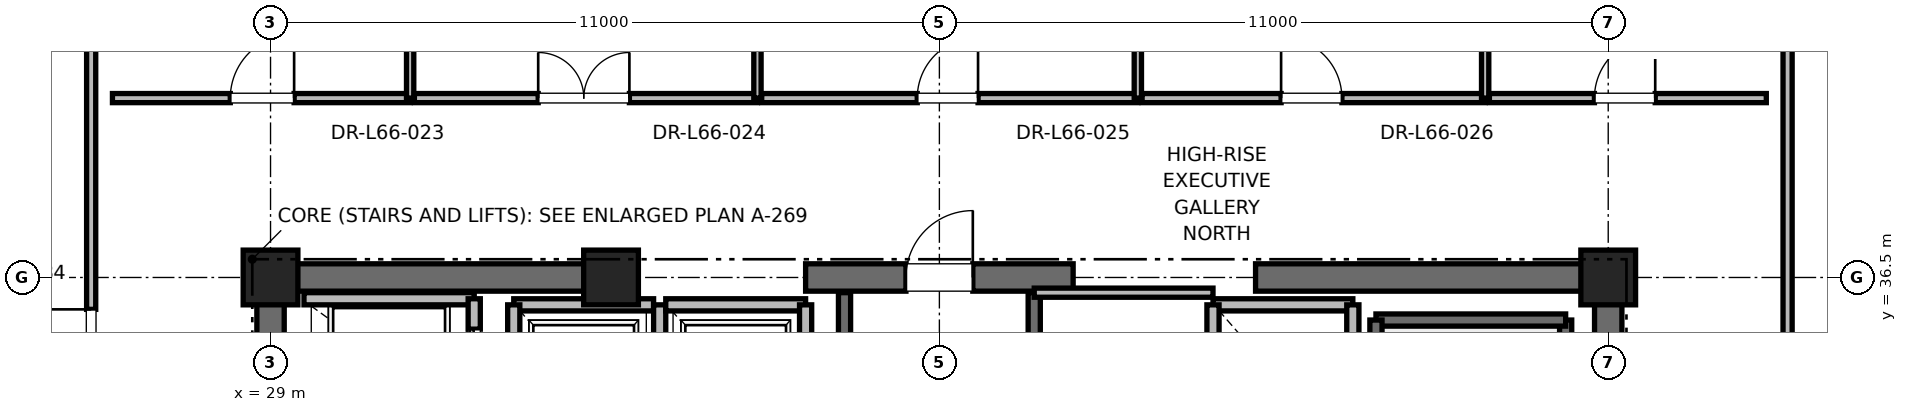
"""IFC4 building model, lengths in metres.
Left out: names, types, materials, properties, quantities, classifications, styles, units other than length and angle.
Written with IfcOpenShell. Run it as: python <this file> out.ifc"""

import sys

from ifc_helpers import new_model, si_unit, direction, frame, frame_2d, origin, origin_2d, place, context, subcontext, project, spatial, rectangle, extrude, element, fill, save


model = new_model("IFC4")
c1 = context("Model", 3, precision=1e-05, world=origin(), true_north=direction((0.0, 1.0)))
c2 = subcontext(c1, "Body", "Model", "MODEL_VIEW")
j1 = project(units=[si_unit("LENGTHUNIT", "METRE"), si_unit("PLANEANGLEUNIT", "RADIAN")], contexts=[c1])
p1 = place(None, origin())
s1 = spatial("IfcSite", under=j1, at=p1, CompositionType="ELEMENT")
p2 = place(p1, origin())
s2 = spatial("IfcBuilding", under=s1, at=p2, CompositionType="ELEMENT")
p3 = place(p2, frame((0.0, 0.0, 283.2)))
s3 = spatial("IfcBuildingStorey", under=s2, at=p3, CompositionType="ELEMENT", Elevation=283.2)
for number, where, z_axis, x_axis in (
    (1, (29.0, 36.5, 0.0), (0.0, 0.0, 1.0), (1.0, 0.0, 0.0)),
    (2, (51.0, 36.5, 0.0), (0.0, 0.0, 1.0), (1.0, 0.0, 0.0)),
    (3, (34.6, 36.5, 0.0), (0.0, 0.0, 1.0), (1.0, 0.0, 0.0)),
):
    element("IfcColumn", number, at=place(p3, frame(where, z_axis=z_axis, x_axis=x_axis)), inside=s3, PredefinedType="PILASTER", context=c2, shape_type="SweptSolid", body=[
        extrude(rectangle(XDim=0.9, YDim=0.9, at=origin_2d()), origin(), (0.0, 0.0, 1.0), 4.0),
    ])
p4 = place(p3, frame((29.0, 36.5, 0.0), z_axis=(0.0, 0.0, 1.0), x_axis=(1.0, 0.0, 0.0)))
e4 = element("IfcWall", 4, at=p4, inside=s3, PredefinedType="SHEAR", context=c2, shape_type="SweptSolid", body=[
    extrude(rectangle(XDim=5.8, YDim=0.45, at=frame_2d((2.9, 0.0))), origin(), (0.0, 0.0, 1.0), 3.785),
])
p5 = place(p3, frame((37.8, 36.5, 0.0), z_axis=(0.0, 0.0, 1.0), x_axis=(1.0, 0.0, 0.0)))
e5 = element("IfcWall", 5, at=p5, inside=s3, PredefinedType="SHEAR", context=c2, shape_type="SweptSolid", body=[
    extrude(rectangle(XDim=4.4, YDim=0.45, at=frame_2d((2.2, 0.0))), origin(), (0.0, 0.0, 1.0), 3.785),
])
p6 = place(p5, frame((1.65, 0.0, 0.0)))
e6 = element("IfcOpeningElement", 6, at=p6, cuts=e5, PredefinedType="OPENING", context=c2, shape_type="SweptSolid", body=[
    extrude(rectangle(XDim=1.1, YDim=2.15, at=frame_2d((0.55, 1.075))), frame((0.0, 0.225, 0.0), z_axis=(0.0, -1.0, 0.0), x_axis=(1.0, 0.0, 0.0)), (0.0, 0.0, 1.0), 0.45),
])
for number, where, z_axis, x_axis in (
    (7, (45.2, 36.5, 0.0), (0.0, 0.0, 1.0), (1.0, 0.0, 0.0)),
    (8, (29.0, 30.7, 0.0), (0.0, 0.0, 1.0), (0.0, 1.0, 0.0)),
):
    element("IfcWall", number, at=place(p3, frame(where, z_axis=z_axis, x_axis=x_axis)), inside=s3, PredefinedType="SHEAR", context=c2, shape_type="SweptSolid", body=[
        extrude(rectangle(XDim=5.8, YDim=0.45, at=frame_2d((2.9, 0.0))), origin(), (0.0, 0.0, 1.0), 3.785),
    ])
p7 = place(p3, frame((51.0, 27.7, 0.0), z_axis=(0.0, 0.0, 1.0), x_axis=(0.0, 1.0, 0.0)))
e9 = element("IfcWall", 9, at=p7, inside=s3, PredefinedType="SHEAR", context=c2, shape_type="SweptSolid", body=[
    extrude(rectangle(XDim=8.8, YDim=0.45, at=frame_2d((4.4, 0.0))), origin(), (0.0, 0.0, 1.0), 3.785),
])
p8 = place(p3, frame((50.3, 27.65, 0.0), z_axis=(0.0, 0.0, 1.0), x_axis=(0.0, 1.0, 0.0)))
e10 = element("IfcWall", 10, at=p8, inside=s3, PredefinedType="SOLIDWALL", context=c2, shape_type="SweptSolid", body=[
    extrude(rectangle(XDim=8.15, YDim=0.2, at=frame_2d((4.075, 0.0))), origin(), (0.0, 0.0, 1.0), 3.785),
])
p9 = place(p3, frame((47.18, 35.8, 0.0), z_axis=(0.0, 0.0, 1.0), x_axis=(1.0, 0.0, 0.0)))
e11 = element("IfcWall", 11, at=p9, inside=s3, PredefinedType="SOLIDWALL", context=c2, shape_type="SweptSolid", body=[
    extrude(rectangle(XDim=3.12, YDim=0.2, at=frame_2d((1.56, 0.0))), origin(), (0.0, 0.0, 1.0), 3.785),
])
p10 = place(p3, frame((47.18, 27.62, 0.0), z_axis=(0.0, 0.0, 1.0), x_axis=(0.0, 1.0, 0.0)))
e12 = element("IfcWall", 12, at=p10, inside=s3, PredefinedType="SOLIDWALL", context=c2, shape_type="SweptSolid", body=[
    extrude(rectangle(XDim=8.18, YDim=0.2, at=frame_2d((4.09, 0.0))), origin(), (0.0, 0.0, 1.0), 3.785),
])
p11 = place(p3, frame((38.44, 27.38, 0.0), z_axis=(0.0, 0.0, 1.0), x_axis=(0.0, 1.0, 0.0)))
e13 = element("IfcWall", 13, at=p11, inside=s3, PredefinedType="SOLIDWALL", context=c2, shape_type="SweptSolid", body=[
    extrude(rectangle(XDim=8.87, YDim=0.2, at=frame_2d((4.435, 0.0))), origin(), (0.0, 0.0, 1.0), 3.785),
])
p12 = place(p3, frame((41.56, 27.68, 0.0), z_axis=(0.0, 0.0, 1.0), x_axis=(0.0, 1.0, 0.0)))
e14 = element("IfcWall", 14, at=p12, inside=s3, PredefinedType="SOLIDWALL", context=c2, shape_type="SweptSolid", body=[
    extrude(rectangle(XDim=8.57, YDim=0.2, at=frame_2d((4.285, 0.0))), origin(), (0.0, 0.0, 1.0), 3.785),
])
p13 = place(p3, frame((32.35, 36.15, 0.0), z_axis=(0.0, 0.0, 1.0), x_axis=(-1.0, 0.0, 0.0)))
e15 = element("IfcWall", 15, at=p13, inside=s3, PredefinedType="SOLIDWALL", context=c2, shape_type="SweptSolid", body=[
    extrude(rectangle(XDim=2.8, YDim=0.2, at=frame_2d((1.4, 0.0))), origin(), (0.0, 0.0, 1.0), 3.148),
])
p14 = place(p3, frame((32.35, 34.05, 0.0), z_axis=(0.0, 0.0, 1.0), x_axis=(0.0, 1.0, 0.0)))
e16 = element("IfcWall", 16, at=p14, inside=s3, PredefinedType="SOLIDWALL", context=c2, shape_type="SweptSolid", body=[
    extrude(rectangle(XDim=2.1, YDim=0.2, at=frame_2d((1.05, 0.0))), origin(), (0.0, 0.0, 1.0), 3.785),
])
p15 = place(p14, frame((0.5, 0.0, 0.0)))
e17 = element("IfcOpeningElement", 17, at=p15, cuts=e16, PredefinedType="OPENING", context=c2, shape_type="SweptSolid", body=[
    extrude(rectangle(XDim=1.1, YDim=2.2, at=frame_2d((0.55, 1.1))), frame((0.0, 0.1, 0.0), z_axis=(0.0, -1.0, 0.0), x_axis=(1.0, 0.0, 0.0)), (0.0, 0.0, 1.0), 0.2),
])
p16 = place(p3, frame((35.3, 36.05, 0.0), z_axis=(0.0, 0.0, 1.0), x_axis=(-1.0, 0.0, 0.0)))
e18 = element("IfcWall", 18, at=p16, inside=s3, PredefinedType="SOLIDWALL", context=c2, shape_type="SweptSolid", body=[
    extrude(rectangle(XDim=2.3, YDim=0.2, at=frame_2d((1.15, 0.0))), origin(), (0.0, 0.0, 1.0), 2.865),
])
p17 = place(p3, frame((33.0, 36.05, 0.0), z_axis=(0.0, 0.0, 1.0), x_axis=(0.0, -1.0, 0.0)))
e19 = element("IfcWall", 19, at=p17, inside=s3, PredefinedType="SOLIDWALL", context=c2, shape_type="SweptSolid", body=[
    extrude(rectangle(XDim=2.6, YDim=0.2, at=frame_2d((1.3, 0.0))), origin(), (0.0, 0.0, 1.0), 3.785),
])
p18 = place(p3, frame((35.4, 33.45, 0.0), z_axis=(0.0, 0.0, 1.0), x_axis=(0.0, 1.0, 0.0)))
e20 = element("IfcWall", 20, at=p18, inside=s3, PredefinedType="SOLIDWALL", context=c2, shape_type="SweptSolid", body=[
    extrude(rectangle(XDim=2.6, YDim=0.2, at=frame_2d((1.3, 0.0))), origin(), (0.0, 0.0, 1.0), 2.865),
])
p19 = place(p3, frame((37.8, 36.05, 0.0), z_axis=(0.0, 0.0, 1.0), x_axis=(-1.0, 0.0, 0.0)))
e21 = element("IfcWall", 21, at=p19, inside=s3, PredefinedType="SOLIDWALL", context=c2, shape_type="SweptSolid", body=[
    extrude(rectangle(XDim=2.3, YDim=0.2, at=frame_2d((1.15, 0.0))), origin(), (0.0, 0.0, 1.0), 2.865),
])
p20 = place(p3, frame((37.8, 33.45, 0.0), z_axis=(0.0, 0.0, 1.0), x_axis=(0.0, 1.0, 0.0)))
e22 = element("IfcWall", 22, at=p20, inside=s3, PredefinedType="SOLIDWALL", context=c2, shape_type="SweptSolid", body=[
    extrude(rectangle(XDim=2.6, YDim=0.2, at=frame_2d((1.3, 0.0))), origin(), (0.0, 0.0, 1.0), 2.865),
])
p21 = place(p3, frame((46.8, 36.05, 0.0), z_axis=(0.0, 0.0, 1.0), x_axis=(-1.0, 0.0, 0.0)))
e23 = element("IfcWall", 23, at=p21, inside=s3, PredefinedType="SOLIDWALL", context=c2, shape_type="SweptSolid", body=[
    extrude(rectangle(XDim=2.3, YDim=0.2, at=frame_2d((1.15, 0.0))), origin(), (0.0, 0.0, 1.0), 2.865),
])
p22 = place(p3, frame((44.5, 36.05, 0.0), z_axis=(0.0, 0.0, 1.0), x_axis=(0.0, -1.0, 0.0)))
e24 = element("IfcWall", 24, at=p22, inside=s3, PredefinedType="SOLIDWALL", context=c2, shape_type="SweptSolid", body=[
    extrude(rectangle(XDim=2.6, YDim=0.2, at=frame_2d((1.3, 0.0))), origin(), (0.0, 0.0, 1.0), 2.865),
])
p23 = place(p3, frame((46.8, 33.45, 0.0), z_axis=(0.0, 0.0, 1.0), x_axis=(0.0, 1.0, 0.0)))
e25 = element("IfcWall", 25, at=p23, inside=s3, PredefinedType="SOLIDWALL", context=c2, shape_type="SweptSolid", body=[
    extrude(rectangle(XDim=2.6, YDim=0.2, at=frame_2d((1.3, 0.0))), origin(), (0.0, 0.0, 1.0), 3.785),
])
p24 = place(p3, frame((41.56, 36.25, 0.0), z_axis=(0.0, 0.0, 1.0), x_axis=(1.0, 0.0, 0.0)))
e26 = element("IfcWall", 26, at=p24, inside=s3, PredefinedType="PARTITIONING", context=c2, shape_type="SweptSolid", body=[
    extrude(rectangle(XDim=2.94, YDim=0.15, at=frame_2d((1.47, 0.0))), origin(), (0.0, 0.0, 1.0), 2.85),
])
p25 = place(p3, frame((26.4, 39.45, 0.0), z_axis=(0.0, 0.0, 1.0), x_axis=(1.0, 0.0, 0.0)))
e27 = element("IfcWall", 27, at=p25, inside=s3, PredefinedType="PARTITIONING", context=c2, shape_type="SweptSolid", body=[
    extrude(rectangle(XDim=4.896, YDim=0.15, at=frame_2d((2.448, 0.0))), origin(), (0.0, 0.0, 1.0), 2.85),
])
p26 = place(p25, frame((1.938, 0.0, 0.0)))
e28 = element("IfcOpeningElement", 28, at=p26, cuts=e27, PredefinedType="OPENING", context=c2, shape_type="SweptSolid", body=[
    extrude(rectangle(XDim=1.05, YDim=2.2, at=frame_2d((0.525, 1.1))), frame((0.0, 0.075, 0.0), z_axis=(0.0, -1.0, 0.0), x_axis=(1.0, 0.0, 0.0)), (0.0, 0.0, 1.0), 0.15),
])
p27 = place(p3, frame((31.296, 39.45, 0.0), z_axis=(0.0, 0.0, 1.0), x_axis=(0.0, 1.0, 0.0)))
e29 = element("IfcWall", 29, at=p27, inside=s3, PredefinedType="PARTITIONING", context=c2, shape_type="SweptSolid", body=[
    extrude(rectangle(XDim=10.09, YDim=0.12, at=frame_2d((5.045, 0.0))), origin(), (0.0, 0.0, 1.0), 2.415),
])
p28 = place(p3, frame((31.366, 39.45, 0.0), z_axis=(0.0, 0.0, 1.0), x_axis=(1.0, 0.0, 0.0)))
e30 = element("IfcWall", 30, at=p28, inside=s3, PredefinedType="PARTITIONING", context=c2, shape_type="SweptSolid", body=[
    extrude(rectangle(XDim=5.642, YDim=0.15, at=frame_2d((2.821, 0.0))), origin(), (0.0, 0.0, 1.0), 2.85),
])
p29 = place(p28, frame((2.036, 0.0, 0.0)))
e31 = element("IfcOpeningElement", 31, at=p29, cuts=e30, PredefinedType="OPENING", context=c2, shape_type="SweptSolid", body=[
    extrude(rectangle(XDim=1.5, YDim=2.25, at=frame_2d((0.75, 1.125))), frame((0.0, 0.075, 0.0), z_axis=(0.0, -1.0, 0.0), x_axis=(1.0, 0.0, 0.0)), (0.0, 0.0, 1.0), 0.15),
])
p30 = place(p3, frame((37.008, 39.45, 0.0), z_axis=(0.0, 0.0, 1.0), x_axis=(0.0, 1.0, 0.0)))
e32 = element("IfcWall", 32, at=p30, inside=s3, PredefinedType="PARTITIONING", context=c2, shape_type="SweptSolid", body=[
    extrude(rectangle(XDim=10.09, YDim=0.12, at=frame_2d((5.045, 0.0))), origin(), (0.0, 0.0, 1.0), 2.415),
])
p31 = place(p3, frame((37.078, 39.45, 0.0), z_axis=(0.0, 0.0, 1.0), x_axis=(1.0, 0.0, 0.0)))
e33 = element("IfcWall", 33, at=p31, inside=s3, PredefinedType="PARTITIONING", context=c2, shape_type="SweptSolid", body=[
    extrude(rectangle(XDim=6.186, YDim=0.15, at=frame_2d((3.093, 0.0))), origin(), (0.0, 0.0, 1.0), 2.85),
])
p32 = place(p31, frame((2.558, 0.0, 0.0)))
e34 = element("IfcOpeningElement", 34, at=p32, cuts=e33, PredefinedType="OPENING", context=c2, shape_type="SweptSolid", body=[
    extrude(rectangle(XDim=1.0, YDim=2.15, at=frame_2d((0.5, 1.075))), frame((0.0, 0.075, 0.0), z_axis=(0.0, -1.0, 0.0), x_axis=(1.0, 0.0, 0.0)), (0.0, 0.0, 1.0), 0.15),
])
p33 = place(p3, frame((43.264, 39.45, 0.0), z_axis=(0.0, 0.0, 1.0), x_axis=(0.0, 1.0, 0.0)))
e35 = element("IfcWall", 35, at=p33, inside=s3, PredefinedType="PARTITIONING", context=c2, shape_type="SweptSolid", body=[
    extrude(rectangle(XDim=10.09, YDim=0.12, at=frame_2d((5.045, 0.0))), origin(), (0.0, 0.0, 1.0), 2.415),
])
p34 = place(p3, frame((43.334, 39.45, 0.0), z_axis=(0.0, 0.0, 1.0), x_axis=(1.0, 0.0, 0.0)))
e36 = element("IfcWall", 36, at=p34, inside=s3, PredefinedType="PARTITIONING", context=c2, shape_type="SweptSolid", body=[
    extrude(rectangle(XDim=5.642, YDim=0.15, at=frame_2d((2.821, 0.0))), origin(), (0.0, 0.0, 1.0), 2.85),
])
p35 = place(p34, frame((2.286, 0.0, 0.0)))
e37 = element("IfcOpeningElement", 37, at=p35, cuts=e36, PredefinedType="OPENING", context=c2, shape_type="SweptSolid", body=[
    extrude(rectangle(XDim=1.0, YDim=2.15, at=frame_2d((0.5, 1.075))), frame((0.0, 0.075, 0.0), z_axis=(0.0, -1.0, 0.0), x_axis=(1.0, 0.0, 0.0)), (0.0, 0.0, 1.0), 0.15),
])
p36 = place(p3, frame((48.976, 39.45, 0.0), z_axis=(0.0, 0.0, 1.0), x_axis=(0.0, 1.0, 0.0)))
e38 = element("IfcWall", 38, at=p36, inside=s3, PredefinedType="PARTITIONING", context=c2, shape_type="SweptSolid", body=[
    extrude(rectangle(XDim=10.09, YDim=0.12, at=frame_2d((5.045, 0.0))), origin(), (0.0, 0.0, 1.0), 2.415),
])
p37 = place(p3, frame((49.046, 39.45, 0.0), z_axis=(0.0, 0.0, 1.0), x_axis=(1.0, 0.0, 0.0)))
e39 = element("IfcWall", 39, at=p37, inside=s3, PredefinedType="PARTITIONING", context=c2, shape_type="SweptSolid", body=[
    extrude(rectangle(XDim=4.554, YDim=0.15, at=frame_2d((2.277, 0.0))), origin(), (0.0, 0.0, 1.0), 2.85),
])
p38 = place(p37, frame((1.727, 0.0, 0.0)))
e40 = element("IfcOpeningElement", 40, at=p38, cuts=e39, PredefinedType="OPENING", context=c2, shape_type="SweptSolid", body=[
    extrude(rectangle(XDim=1.0, YDim=2.15, at=frame_2d((0.5, 1.075))), frame((0.0, 0.075, 0.0), z_axis=(0.0, -1.0, 0.0), x_axis=(1.0, 0.0, 0.0)), (0.0, 0.0, 1.0), 0.15),
])
p39 = place(p3, frame((26.05, 34.501, 0.0), z_axis=(0.0, 0.0, 1.0), x_axis=(0.0, 1.0, 0.0)))
e41 = element("IfcWall", 41, at=p39, inside=s3, PredefinedType="PARTITIONING", context=c2, shape_type="SweptSolid", body=[
    extrude(rectangle(XDim=11.239, YDim=0.15, at=frame_2d((5.62, 0.0))), origin(), (0.0, 0.0, 1.0), 2.85),
])
p40 = place(p39, frame((0.424, 0.0, 0.0)))
e42 = element("IfcOpeningElement", 42, at=p40, cuts=e41, PredefinedType="OPENING", context=c2, shape_type="SweptSolid", body=[
    extrude(rectangle(XDim=1.05, YDim=2.2, at=frame_2d((0.525, 1.1))), frame((0.0, 0.075, 0.0), z_axis=(0.0, -1.0, 0.0), x_axis=(1.0, 0.0, 0.0)), (0.0, 0.0, 1.0), 0.15),
])
p41 = place(p3, frame((53.95, 24.652, 0.0), z_axis=(0.0, 0.0, 1.0), x_axis=(0.0, 1.0, 0.0)))
e43 = element("IfcWall", 43, at=p41, inside=s3, PredefinedType="PARTITIONING", context=c2, shape_type="SweptSolid", body=[
    extrude(rectangle(XDim=21.089, YDim=0.15, at=frame_2d((10.544, 0.0))), origin(), (0.0, 0.0, 1.0), 2.85),
])
p42 = place(p41, frame((5.374, 0.0, 0.0)))
e44 = element("IfcOpeningElement", 44, at=p42, cuts=e43, PredefinedType="OPENING", context=c2, shape_type="SweptSolid", body=[
    extrude(rectangle(XDim=1.0, YDim=2.15, at=frame_2d((0.5, 1.075))), frame((0.0, 0.075, 0.0), z_axis=(0.0, -1.0, 0.0), x_axis=(1.0, 0.0, 0.0)), (0.0, 0.0, 1.0), 0.15),
])
p43 = place(p6, origin())
e45 = element("IfcDoor", 45, at=p43, inside=s3, OperationType="SINGLE_SWING_RIGHT", PredefinedType="DOOR", context=c2, shape_type="SweptSolid", body=[
    extrude(rectangle(XDim=1.1, YDim=2.15, at=frame_2d((0.55, 1.075))), frame((0.0, 0.025, 0.0), z_axis=(0.0, -1.0, 0.0), x_axis=(1.0, 0.0, 0.0)), (0.0, 0.0, 1.0), 0.05),
])
fill(e6, e45)
p44 = place(p15, origin())
e46 = element("IfcDoor", 46, at=p44, inside=s3, OperationType="SLIDING_TO_RIGHT", PredefinedType="DOOR", context=c2, shape_type="SweptSolid", body=[
    extrude(rectangle(XDim=1.1, YDim=2.2, at=frame_2d((0.55, 1.1))), frame((0.0, 0.025, 0.0), z_axis=(0.0, -1.0, 0.0), x_axis=(1.0, 0.0, 0.0)), (0.0, 0.0, 1.0), 0.05),
])
fill(e17, e46)
p45 = place(p26, origin())
e47 = element("IfcDoor", 47, at=p45, inside=s3, OperationType="SINGLE_SWING_RIGHT", PredefinedType="DOOR", context=c2, shape_type="SweptSolid", body=[
    extrude(rectangle(XDim=1.05, YDim=2.2, at=frame_2d((0.525, 1.1))), frame((0.0, 0.025, 0.0), z_axis=(0.0, -1.0, 0.0), x_axis=(1.0, 0.0, 0.0)), (0.0, 0.0, 1.0), 0.05),
])
fill(e28, e47)
p46 = place(p29, origin())
e48 = element("IfcDoor", 48, at=p46, inside=s3, OperationType="DOUBLE_DOOR_SINGLE_SWING", PredefinedType="DOOR", context=c2, shape_type="SweptSolid", body=[
    extrude(rectangle(XDim=1.5, YDim=2.25, at=frame_2d((0.75, 1.125))), frame((0.0, 0.025, 0.0), z_axis=(0.0, -1.0, 0.0), x_axis=(1.0, 0.0, 0.0)), (0.0, 0.0, 1.0), 0.05),
])
fill(e31, e48)
p47 = place(p32, origin())
e49 = element("IfcDoor", 49, at=p47, inside=s3, OperationType="SINGLE_SWING_RIGHT", PredefinedType="DOOR", context=c2, shape_type="SweptSolid", body=[
    extrude(rectangle(XDim=1.0, YDim=2.15, at=frame_2d((0.5, 1.075))), frame((0.0, 0.025, 0.0), z_axis=(0.0, -1.0, 0.0), x_axis=(1.0, 0.0, 0.0)), (0.0, 0.0, 1.0), 0.05),
])
fill(e34, e49)
p48 = place(p35, origin())
e50 = element("IfcDoor", 50, at=p48, inside=s3, OperationType="SINGLE_SWING_LEFT", PredefinedType="DOOR", context=c2, shape_type="SweptSolid", body=[
    extrude(rectangle(XDim=1.0, YDim=2.15, at=frame_2d((0.5, 1.075))), frame((0.0, 0.025, 0.0), z_axis=(0.0, -1.0, 0.0), x_axis=(1.0, 0.0, 0.0)), (0.0, 0.0, 1.0), 0.05),
])
fill(e37, e50)
p49 = place(p38, origin())
e51 = element("IfcDoor", 51, at=p49, inside=s3, OperationType="SINGLE_SWING_RIGHT", PredefinedType="DOOR", context=c2, shape_type="SweptSolid", body=[
    extrude(rectangle(XDim=1.0, YDim=2.15, at=frame_2d((0.5, 1.075))), frame((0.0, 0.025, 0.0), z_axis=(0.0, -1.0, 0.0), x_axis=(1.0, 0.0, 0.0)), (0.0, 0.0, 1.0), 0.05),
])
fill(e40, e51)
p50 = place(p40, origin())
e52 = element("IfcDoor", 52, at=p50, inside=s3, OperationType="SINGLE_SWING_RIGHT", PredefinedType="DOOR", context=c2, shape_type="SweptSolid", body=[
    extrude(rectangle(XDim=1.05, YDim=2.2, at=frame_2d((0.525, 1.1))), frame((0.0, 0.025, 0.0), z_axis=(0.0, -1.0, 0.0), x_axis=(1.0, 0.0, 0.0)), (0.0, 0.0, 1.0), 0.05),
])
fill(e42, e52)
save(model, sys.argv[1])
